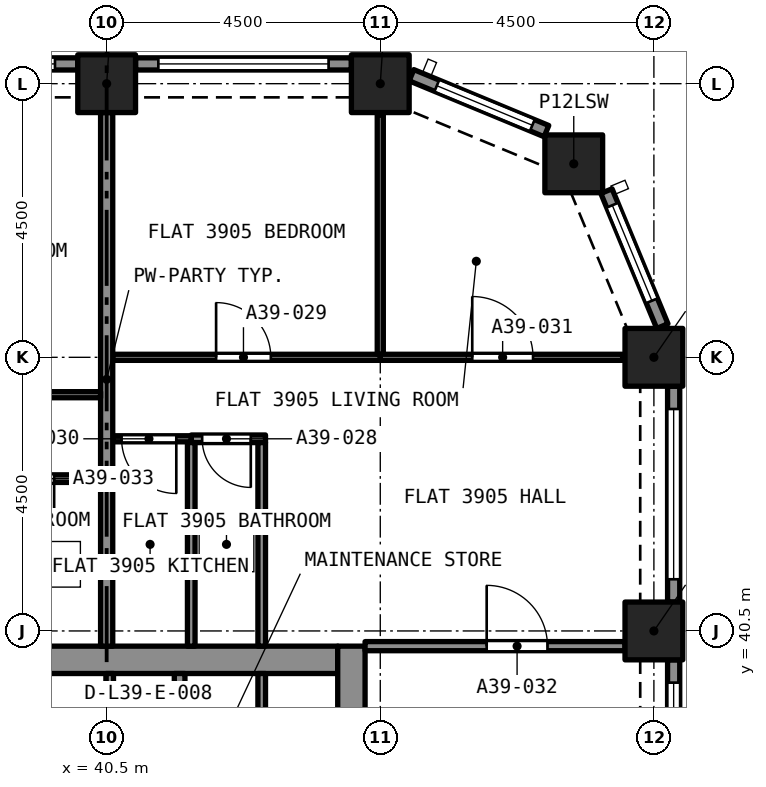
"""IFC4 building model, lengths in metres.
Left out: names, types, materials, properties, quantities, classifications, styles, units other than length and angle.
Written with IfcOpenShell. Run it as: python <this file> out.ifc"""

import sys

from ifc_helpers import new_model, si_unit, direction, frame, frame_2d, origin, origin_2d, place, context, subcontext, project, spatial, rectangle, extrude, element, fill, save


model = new_model("IFC4")
c1 = context("Model", 3, precision=1e-05, world=origin(), true_north=direction((0.0, 1.0)))
c2 = subcontext(c1, "Body", "Model", "MODEL_VIEW")
j1 = project(units=[si_unit("LENGTHUNIT", "METRE"), si_unit("PLANEANGLEUNIT", "RADIAN")], contexts=[c1])
p1 = place(None, origin())
s1 = spatial("IfcSite", under=j1, at=p1, CompositionType="ELEMENT")
p2 = place(p1, origin())
s2 = spatial("IfcBuilding", under=s1, at=p2, CompositionType="ELEMENT")
p3 = place(p2, frame((0.0, 0.0, 139.8)))
s3 = spatial("IfcBuildingStorey", under=s2, at=p3, CompositionType="ELEMENT", Elevation=139.8)
for number, where, z_axis, x_axis in (
    (1, (49.5, 40.5, 0.0), (0.0, 0.0, 1.0), (1.0, 0.0, 0.0)),
    (2, (49.5, 45.0, 0.0), (0.0, 0.0, 1.0), (1.0, 0.0, 0.0)),
    (3, (48.182, 48.182, 0.0), (0.0, 0.0, 1.0), (1.0, 0.0, 0.0)),
    (4, (40.5, 49.5, 0.0), (0.0, 0.0, 1.0), (1.0, 0.0, 0.0)),
    (5, (45.0, 49.5, 0.0), (0.0, 0.0, 1.0), (1.0, 0.0, 0.0)),
):
    element("IfcColumn", number, at=place(p3, frame(where, z_axis=z_axis, x_axis=x_axis)), inside=s3, PredefinedType="COLUMN", context=c2, shape_type="SweptSolid", body=[
        extrude(rectangle(XDim=0.95, YDim=0.95, at=origin_2d()), origin(), (0.0, 0.0, 1.0), 3.2),
    ])
p4 = place(p3, frame((36.7, 40.025, 0.0), z_axis=(0.0, 0.0, 1.0), x_axis=(1.0, 0.0, 0.0)))
e6 = element("IfcWall", 6, at=p4, inside=s3, PredefinedType="SOLIDWALL", context=c2, shape_type="SweptSolid", body=[
    extrude(rectangle(XDim=7.6, YDim=0.45, at=frame_2d((3.8, 0.0))), origin(), (0.0, 0.0, 1.0), 3.2),
])
p5 = place(p3, frame((44.525, 27.25, 0.0), z_axis=(0.0, 0.0, 1.0), x_axis=(0.0, 1.0, 0.0)))
e7 = element("IfcWall", 7, at=p5, inside=s3, PredefinedType="SOLIDWALL", context=c2, shape_type="SweptSolid", body=[
    extrude(rectangle(XDim=13.0, YDim=0.45, at=frame_2d((6.5, 0.0))), origin(), (0.0, 0.0, 1.0), 3.2),
])
p6 = place(p5, frame((8.7, 0.0, 0.0)))
e8 = element("IfcOpeningElement", 8, at=p6, cuts=e7, PredefinedType="OPENING", context=c2, shape_type="SweptSolid", body=[
    extrude(rectangle(XDim=1.2, YDim=2.1, at=frame_2d((0.6, 1.05))), frame((0.0, 0.235, 0.0), z_axis=(0.0, -1.0, 0.0), x_axis=(1.0, 0.0, 0.0)), (0.0, 0.0, 1.0), 0.47),
])
p7 = place(p3, frame((49.825, 40.025, 0.0), z_axis=(0.0, 0.0, 1.0), x_axis=(0.0, -1.0, 0.0)))
e9 = element("IfcWall", 9, at=p7, inside=s3, PredefinedType="SOLIDWALL", context=c2, shape_type="SweptSolid", body=[
    extrude(rectangle(XDim=3.55, YDim=0.2, at=frame_2d((1.775, 0.0))), origin(), (0.0, 0.0, 1.0), 3.2),
])
p8 = place(p7, frame((0.375, 0.0, 0.45)))
e10 = element("IfcOpeningElement", 10, at=p8, cuts=e9, PredefinedType="OPENING", context=c2, shape_type="SweptSolid", body=[
    extrude(rectangle(XDim=2.8, YDim=1.95, at=frame_2d((1.4, 0.975))), frame((0.0, 0.11, 0.0), z_axis=(0.0, -1.0, 0.0), x_axis=(1.0, 0.0, 0.0)), (0.0, 0.0, 1.0), 0.22),
])
p9 = place(p3, frame((49.825, 44.525, 0.0), z_axis=(0.0, 0.0, 1.0), x_axis=(0.0, -1.0, 0.0)))
e11 = element("IfcWall", 11, at=p9, inside=s3, PredefinedType="SOLIDWALL", context=c2, shape_type="SweptSolid", body=[
    extrude(rectangle(XDim=3.55, YDim=0.2, at=frame_2d((1.775, 0.0))), origin(), (0.0, 0.0, 1.0), 3.2),
])
p10 = place(p9, frame((0.375, 0.0, 0.45)))
e12 = element("IfcOpeningElement", 12, at=p10, cuts=e11, PredefinedType="OPENING", context=c2, shape_type="SweptSolid", body=[
    extrude(rectangle(XDim=2.8, YDim=1.95, at=frame_2d((1.4, 0.975))), frame((0.0, 0.11, 0.0), z_axis=(0.0, -1.0, 0.0), x_axis=(1.0, 0.0, 0.0)), (0.0, 0.0, 1.0), 0.22),
])
p11 = place(p3, frame((48.72, 47.733, 0.0), z_axis=(0.0, 0.0, 1.0), x_axis=(0.382680855588, -0.923880599843, 0.0)))
e13 = element("IfcWall", 13, at=p11, inside=s3, PredefinedType="SOLIDWALL", context=c2, shape_type="SweptSolid", body=[
    extrude(rectangle(XDim=2.403, YDim=0.2, at=frame_2d((1.201, 0.0))), origin(), (0.0, 0.0, 1.0), 3.2),
])
p12 = place(p11, frame((0.251, 0.0, 0.45)))
e14 = element("IfcOpeningElement", 14, at=p12, cuts=e13, PredefinedType="OPENING", context=c2, shape_type="SweptSolid", body=[
    extrude(rectangle(XDim=1.7, YDim=1.95, at=frame_2d((0.85, 0.975))), frame((0.0, 0.11, 0.0), z_axis=(0.0, -1.0, 0.0), x_axis=(1.0, 0.0, 0.0)), (0.0, 0.0, 1.0), 0.22),
])
p13 = place(p3, frame((45.513, 49.639, 0.0), z_axis=(0.0, 0.0, 1.0), x_axis=(0.923880599843, -0.382680855588, 0.0)))
e15 = element("IfcWall", 15, at=p13, inside=s3, PredefinedType="SOLIDWALL", context=c2, shape_type="SweptSolid", body=[
    extrude(rectangle(XDim=2.403, YDim=0.2, at=frame_2d((1.201, 0.0))), origin(), (0.0, 0.0, 1.0), 3.2),
])
p14 = place(p13, frame((0.451, 0.0, 0.45)))
e16 = element("IfcOpeningElement", 16, at=p14, cuts=e15, PredefinedType="OPENING", context=c2, shape_type="SweptSolid", body=[
    extrude(rectangle(XDim=1.7, YDim=1.95, at=frame_2d((0.85, 0.975))), frame((0.0, 0.11, 0.0), z_axis=(0.0, -1.0, 0.0), x_axis=(1.0, 0.0, 0.0)), (0.0, 0.0, 1.0), 0.22),
])
p15 = place(p3, frame((40.975, 49.825, 0.0), z_axis=(0.0, 0.0, 1.0), x_axis=(1.0, 0.0, 0.0)))
e17 = element("IfcWall", 17, at=p15, inside=s3, PredefinedType="SOLIDWALL", context=c2, shape_type="SweptSolid", body=[
    extrude(rectangle(XDim=3.55, YDim=0.2, at=frame_2d((1.775, 0.0))), origin(), (0.0, 0.0, 1.0), 3.2),
])
p16 = place(p15, frame((0.375, 0.0, 0.45)))
e18 = element("IfcOpeningElement", 18, at=p16, cuts=e17, PredefinedType="OPENING", context=c2, shape_type="SweptSolid", body=[
    extrude(rectangle(XDim=2.8, YDim=1.95, at=frame_2d((1.4, 0.975))), frame((0.0, 0.11, 0.0), z_axis=(0.0, -1.0, 0.0), x_axis=(1.0, 0.0, 0.0)), (0.0, 0.0, 1.0), 0.22),
])
p17 = place(p3, frame((36.475, 49.825, 0.0), z_axis=(0.0, 0.0, 1.0), x_axis=(1.0, 0.0, 0.0)))
e19 = element("IfcWall", 19, at=p17, inside=s3, PredefinedType="SOLIDWALL", context=c2, shape_type="SweptSolid", body=[
    extrude(rectangle(XDim=3.55, YDim=0.2, at=frame_2d((1.775, 0.0))), origin(), (0.0, 0.0, 1.0), 3.2),
])
p18 = place(p17, frame((0.375, 0.0, 0.45)))
e20 = element("IfcOpeningElement", 20, at=p18, cuts=e19, PredefinedType="OPENING", context=c2, shape_type="SweptSolid", body=[
    extrude(rectangle(XDim=2.8, YDim=1.95, at=frame_2d((1.4, 0.975))), frame((0.0, 0.11, 0.0), z_axis=(0.0, -1.0, 0.0), x_axis=(1.0, 0.0, 0.0)), (0.0, 0.0, 1.0), 0.22),
])
p19 = place(p3, frame((43.113, 43.66, 0.0), z_axis=(0.0, 0.0, 1.0), x_axis=(-1.0, 0.0, 0.0)))
e21 = element("IfcWall", 21, at=p19, inside=s3, PredefinedType="PARTITIONING", context=c2, shape_type="SweptSolid", body=[
    extrude(rectangle(XDim=1.222, YDim=0.125, at=frame_2d((0.611, 0.0))), origin(), (0.0, 0.0, 1.0), 2.9),
])
p20 = place(p19, frame((0.242, 0.0, 0.0)))
e22 = element("IfcOpeningElement", 22, at=p20, cuts=e21, PredefinedType="OPENING", context=c2, shape_type="SweptSolid", body=[
    extrude(rectangle(XDim=0.8, YDim=2.1, at=frame_2d((0.4, 1.05))), frame((0.0, 0.073, 0.0), z_axis=(0.0, -1.0, 0.0), x_axis=(1.0, 0.0, 0.0)), (0.0, 0.0, 1.0), 0.145),
])
for number, where, z_axis, x_axis in (
    (23, (43.05, 40.25, 0.0), (0.0, 0.0, 1.0), (0.0, 1.0, 0.0)),
    (24, (41.891, 40.25, 0.0), (0.0, 0.0, 1.0), (0.0, 1.0, 0.0)),
):
    element("IfcWall", number, at=place(p3, frame(where, z_axis=z_axis, x_axis=x_axis)), inside=s3, PredefinedType="PARTITIONING", context=c2, shape_type="SweptSolid", body=[
        extrude(rectangle(XDim=3.347, YDim=0.125, at=frame_2d((1.674, 0.0))), origin(), (0.0, 0.0, 1.0), 2.9),
    ])
p21 = place(p3, frame((40.6, 45.0, 0.0), z_axis=(0.0, 0.0, 1.0), x_axis=(1.0, 0.0, 0.0)))
e25 = element("IfcWall", 25, at=p21, inside=s3, PredefinedType="PARTITIONING", context=c2, shape_type="SweptSolid", body=[
    extrude(rectangle(XDim=4.4, YDim=0.1, at=frame_2d((2.2, 0.0))), origin(), (0.0, 0.0, 1.0), 2.9),
])
p22 = place(p21, frame((1.7, 0.0, 0.0)))
e26 = element("IfcOpeningElement", 26, at=p22, cuts=e25, PredefinedType="OPENING", context=c2, shape_type="SweptSolid", body=[
    extrude(rectangle(XDim=0.9, YDim=2.1, at=frame_2d((0.45, 1.05))), frame((0.0, 0.06, 0.0), z_axis=(0.0, -1.0, 0.0), x_axis=(1.0, 0.0, 0.0)), (0.0, 0.0, 1.0), 0.12),
])
p23 = place(p3, frame((45.0, 45.05, 0.0), z_axis=(0.0, 0.0, 1.0), x_axis=(0.0, 1.0, 0.0)))
e27 = element("IfcWall", 27, at=p23, inside=s3, PredefinedType="PARTITIONING", context=c2, shape_type="SweptSolid", body=[
    extrude(rectangle(XDim=3.936, YDim=0.1, at=frame_2d((1.968, 0.0))), origin(), (0.0, 0.0, 1.0), 2.9),
])
p24 = place(p3, frame((41.891, 43.66, 0.0), z_axis=(0.0, 0.0, 1.0), x_axis=(-1.0, 0.0, 0.0)))
e28 = element("IfcWall", 28, at=p24, inside=s3, PredefinedType="PARTITIONING", context=c2, shape_type="SweptSolid", body=[
    extrude(rectangle(XDim=1.291, YDim=0.1, at=frame_2d((0.646, 0.0))), origin(), (0.0, 0.0, 1.0), 2.9),
])
p25 = place(p24, frame((0.246, 0.0, 0.0)))
e29 = element("IfcOpeningElement", 29, at=p25, cuts=e28, PredefinedType="OPENING", context=c2, shape_type="SweptSolid", body=[
    extrude(rectangle(XDim=0.9, YDim=2.1, at=frame_2d((0.45, 1.05))), frame((0.0, 0.06, 0.0), z_axis=(0.0, -1.0, 0.0), x_axis=(1.0, 0.0, 0.0)), (0.0, 0.0, 1.0), 0.12),
])
p26 = place(p3, frame((45.0, 45.0, 0.0), z_axis=(0.0, 0.0, 1.0), x_axis=(1.0, 0.0, 0.0)))
e30 = element("IfcWall", 30, at=p26, inside=s3, PredefinedType="PARTITIONING", context=c2, shape_type="SweptSolid", body=[
    extrude(rectangle(XDim=3.986, YDim=0.1, at=frame_2d((1.993, 0.0))), origin(), (0.0, 0.0, 1.0), 2.9),
])
p27 = place(p26, frame((1.512, 0.0, 0.0)))
e31 = element("IfcOpeningElement", 31, at=p27, cuts=e30, PredefinedType="OPENING", context=c2, shape_type="SweptSolid", body=[
    extrude(rectangle(XDim=1.0, YDim=2.1, at=frame_2d((0.5, 1.05))), frame((0.0, 0.06, 0.0), z_axis=(0.0, -1.0, 0.0), x_axis=(1.0, 0.0, 0.0)), (0.0, 0.0, 1.0), 0.12),
])
p28 = place(p3, frame((44.75, 40.25, 0.0), z_axis=(0.0, 0.0, 1.0), x_axis=(1.0, 0.0, 0.0)))
e32 = element("IfcWall", 32, at=p28, inside=s3, PredefinedType="PARTITIONING", context=c2, shape_type="SweptSolid", body=[
    extrude(rectangle(XDim=4.275, YDim=0.15, at=frame_2d((2.137, 0.0))), origin(), (0.0, 0.0, 1.0), 2.9),
])
p29 = place(p28, frame((2.0, 0.0, 0.0)))
e33 = element("IfcOpeningElement", 33, at=p29, cuts=e32, PredefinedType="OPENING", context=c2, shape_type="SweptSolid", body=[
    extrude(rectangle(XDim=1.0, YDim=2.1, at=frame_2d((0.5, 1.05))), frame((0.0, 0.085, 0.0), z_axis=(0.0, -1.0, 0.0), x_axis=(1.0, 0.0, 0.0)), (0.0, 0.0, 1.0), 0.17),
])
p30 = place(p3, frame((40.5, 40.25, 0.0), z_axis=(0.0, 0.0, 1.0), x_axis=(0.0, 1.0, 0.0)))
e34 = element("IfcWall", 34, at=p30, inside=s3, PredefinedType="PARTITIONING", context=c2, shape_type="SweptSolid", body=[
    extrude(rectangle(XDim=8.775, YDim=0.2, at=frame_2d((4.387, 0.0))), origin(), (0.0, 0.0, 1.0), 2.9),
])
p31 = place(p3, frame((40.4, 43.005, 0.0), z_axis=(0.0, 0.0, 1.0), x_axis=(-1.0, 0.0, 0.0)))
e35 = element("IfcWall", 35, at=p31, inside=s3, PredefinedType="PARTITIONING", context=c2, shape_type="SweptSolid", body=[
    extrude(rectangle(XDim=2.427, YDim=0.125, at=frame_2d((1.214, 0.0))), origin(), (0.0, 0.0, 1.0), 2.9),
])
p32 = place(p31, frame((0.764, 0.0, 0.0)))
e36 = element("IfcOpeningElement", 36, at=p32, cuts=e35, PredefinedType="OPENING", context=c2, shape_type="SweptSolid", body=[
    extrude(rectangle(XDim=0.8, YDim=2.1, at=frame_2d((0.4, 1.05))), frame((0.0, 0.073, 0.0), z_axis=(0.0, -1.0, 0.0), x_axis=(1.0, 0.0, 0.0)), (0.0, 0.0, 1.0), 0.145),
])
p33 = place(p3, frame((36.0, 44.385, 0.0), z_axis=(0.0, 0.0, 1.0), x_axis=(1.0, 0.0, 0.0)))
e37 = element("IfcWall", 37, at=p33, inside=s3, PredefinedType="PARTITIONING", context=c2, shape_type="SweptSolid", body=[
    extrude(rectangle(XDim=4.4, YDim=0.1, at=frame_2d((2.2, 0.0))), origin(), (0.0, 0.0, 1.0), 2.9),
])
p34 = place(p33, frame((1.8, 0.0, 0.0)))
e38 = element("IfcOpeningElement", 38, at=p34, cuts=e37, PredefinedType="OPENING", context=c2, shape_type="SweptSolid", body=[
    extrude(rectangle(XDim=0.9, YDim=2.1, at=frame_2d((0.45, 1.05))), frame((0.0, 0.06, 0.0), z_axis=(0.0, -1.0, 0.0), x_axis=(1.0, 0.0, 0.0)), (0.0, 0.0, 1.0), 0.12),
])
p35 = place(p3, frame((41.7, 37.5, 0.0), z_axis=(0.0, 0.0, 1.0), x_axis=(0.0, 1.0, 0.0)))
e39 = element("IfcWall", 39, at=p35, inside=s3, PredefinedType="SOLIDWALL", context=c2, shape_type="SweptSolid", body=[
    extrude(rectangle(XDim=2.3, YDim=0.175, at=frame_2d((1.15, 0.0))), origin(), (0.0, 0.0, 1.0), 2.9),
])
for number, where, z_axis, x_axis in (
    (40, (43.05, 37.5, 0.0), (0.0, 0.0, 1.0), (0.0, 1.0, 0.0)),
    (41, (40.55, 37.5, 0.0), (0.0, 0.0, 1.0), (0.0, 1.0, 0.0)),
):
    element("IfcWall", number, at=place(p3, frame(where, z_axis=z_axis, x_axis=x_axis)), inside=s3, PredefinedType="PARTITIONING", context=c2, shape_type="SweptSolid", body=[
        extrude(rectangle(XDim=2.3, YDim=0.125, at=frame_2d((1.15, 0.0))), origin(), (0.0, 0.0, 1.0), 2.9),
    ])
p36 = place(p8, origin())
e42 = element("IfcWindow", 42, at=p36, inside=s3, PartitioningType="SINGLE_PANEL", PredefinedType="WINDOW", context=c2, shape_type="SweptSolid", body=[
    extrude(rectangle(XDim=2.8, YDim=1.95, at=frame_2d((1.4, 0.975))), frame((0.0, 0.03, 0.0), z_axis=(0.0, -1.0, 0.0), x_axis=(1.0, 0.0, 0.0)), (0.0, 0.0, 1.0), 0.06),
])
fill(e10, e42)
p37 = place(p10, origin())
e43 = element("IfcWindow", 43, at=p37, inside=s3, PartitioningType="SINGLE_PANEL", PredefinedType="WINDOW", context=c2, shape_type="SweptSolid", body=[
    extrude(rectangle(XDim=2.8, YDim=1.95, at=frame_2d((1.4, 0.975))), frame((0.0, 0.03, 0.0), z_axis=(0.0, -1.0, 0.0), x_axis=(1.0, 0.0, 0.0)), (0.0, 0.0, 1.0), 0.06),
])
fill(e12, e43)
p38 = place(p12, origin())
e44 = element("IfcWindow", 44, at=p38, inside=s3, PartitioningType="SINGLE_PANEL", PredefinedType="WINDOW", context=c2, shape_type="SweptSolid", body=[
    extrude(rectangle(XDim=1.7, YDim=1.95, at=frame_2d((0.85, 0.975))), frame((0.0, 0.03, 0.0), z_axis=(0.0, -1.0, 0.0), x_axis=(1.0, 0.0, 0.0)), (0.0, 0.0, 1.0), 0.06),
])
fill(e14, e44)
p39 = place(p14, origin())
e45 = element("IfcWindow", 45, at=p39, inside=s3, PartitioningType="SINGLE_PANEL", PredefinedType="WINDOW", context=c2, shape_type="SweptSolid", body=[
    extrude(rectangle(XDim=1.7, YDim=1.95, at=frame_2d((0.85, 0.975))), frame((0.0, 0.03, 0.0), z_axis=(0.0, -1.0, 0.0), x_axis=(1.0, 0.0, 0.0)), (0.0, 0.0, 1.0), 0.06),
])
fill(e16, e45)
p40 = place(p16, origin())
e46 = element("IfcWindow", 46, at=p40, inside=s3, PartitioningType="SINGLE_PANEL", PredefinedType="WINDOW", context=c2, shape_type="SweptSolid", body=[
    extrude(rectangle(XDim=2.8, YDim=1.95, at=frame_2d((1.4, 0.975))), frame((0.0, 0.03, 0.0), z_axis=(0.0, -1.0, 0.0), x_axis=(1.0, 0.0, 0.0)), (0.0, 0.0, 1.0), 0.06),
])
fill(e18, e46)
p41 = place(p18, origin())
e47 = element("IfcWindow", 47, at=p41, inside=s3, PartitioningType="SINGLE_PANEL", PredefinedType="WINDOW", context=c2, shape_type="SweptSolid", body=[
    extrude(rectangle(XDim=2.8, YDim=1.95, at=frame_2d((1.4, 0.975))), frame((0.0, 0.03, 0.0), z_axis=(0.0, -1.0, 0.0), x_axis=(1.0, 0.0, 0.0)), (0.0, 0.0, 1.0), 0.06),
])
fill(e20, e47)
p42 = place(p20, origin())
e48 = element("IfcDoor", 48, at=p42, inside=s3, OperationType="SINGLE_SWING_RIGHT", PredefinedType="DOOR", context=c2, shape_type="SweptSolid", body=[
    extrude(rectangle(XDim=0.8, YDim=2.1, at=frame_2d((0.4, 1.05))), frame((0.0, 0.025, 0.0), z_axis=(0.0, -1.0, 0.0), x_axis=(1.0, 0.0, 0.0)), (0.0, 0.0, 1.0), 0.05),
])
fill(e22, e48)
p43 = place(p22, origin())
e49 = element("IfcDoor", 49, at=p43, inside=s3, OperationType="SINGLE_SWING_LEFT", PredefinedType="DOOR", context=c2, shape_type="SweptSolid", body=[
    extrude(rectangle(XDim=0.9, YDim=2.1, at=frame_2d((0.45, 1.05))), frame((0.0, 0.025, 0.0), z_axis=(0.0, -1.0, 0.0), x_axis=(1.0, 0.0, 0.0)), (0.0, 0.0, 1.0), 0.05),
])
fill(e26, e49)
p44 = place(p25, origin())
e50 = element("IfcDoor", 50, at=p44, inside=s3, OperationType="SINGLE_SWING_RIGHT", PredefinedType="DOOR", context=c2, shape_type="SweptSolid", body=[
    extrude(rectangle(XDim=0.9, YDim=2.1, at=frame_2d((0.45, 1.05))), frame((0.0, 0.025, 0.0), z_axis=(0.0, -1.0, 0.0), x_axis=(1.0, 0.0, 0.0)), (0.0, 0.0, 1.0), 0.05),
])
fill(e29, e50)
p45 = place(p27, origin())
e51 = element("IfcDoor", 51, at=p45, inside=s3, OperationType="SINGLE_SWING_RIGHT", PredefinedType="DOOR", context=c2, shape_type="SweptSolid", body=[
    extrude(rectangle(XDim=1.0, YDim=2.1, at=frame_2d((0.5, 1.05))), frame((0.0, 0.025, 0.0), z_axis=(0.0, -1.0, 0.0), x_axis=(1.0, 0.0, 0.0)), (0.0, 0.0, 1.0), 0.05),
])
fill(e31, e51)
p46 = place(p29, origin())
e52 = element("IfcDoor", 52, at=p46, inside=s3, OperationType="SINGLE_SWING_RIGHT", PredefinedType="DOOR", context=c2, shape_type="SweptSolid", body=[
    extrude(rectangle(XDim=1.0, YDim=2.1, at=frame_2d((0.5, 1.05))), frame((0.0, 0.025, 0.0), z_axis=(0.0, -1.0, 0.0), x_axis=(1.0, 0.0, 0.0)), (0.0, 0.0, 1.0), 0.05),
])
fill(e33, e52)
p47 = place(p32, origin())
e53 = element("IfcDoor", 53, at=p47, inside=s3, OperationType="SINGLE_SWING_LEFT", PredefinedType="DOOR", context=c2, shape_type="SweptSolid", body=[
    extrude(rectangle(XDim=0.8, YDim=2.1, at=frame_2d((0.4, 1.05))), frame((0.0, 0.025, 0.0), z_axis=(0.0, -1.0, 0.0), x_axis=(1.0, 0.0, 0.0)), (0.0, 0.0, 1.0), 0.05),
])
fill(e36, e53)
save(model, sys.argv[1])
